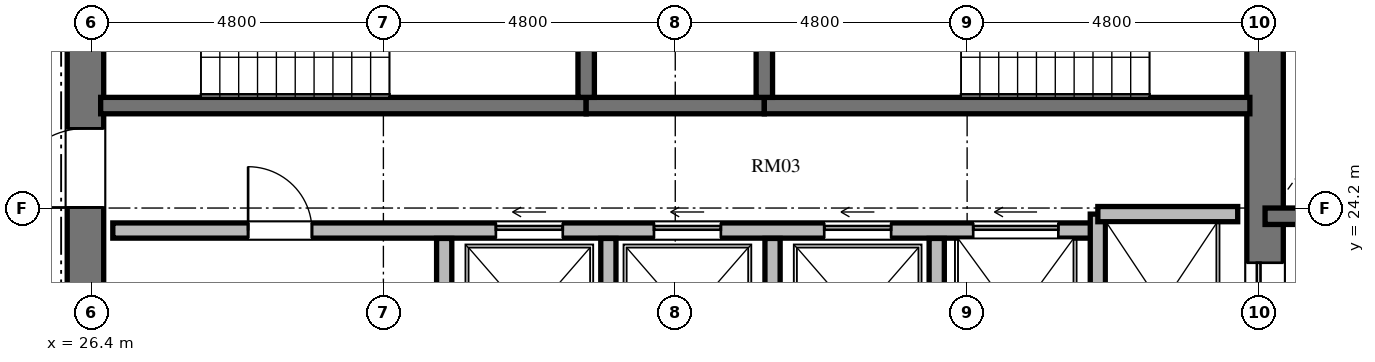
"""IFC4 building model, lengths in metres.
Left out: names, types, materials, properties, quantities, classifications, styles, units other than length and angle.
Written with IfcOpenShell. Run it as: python <this file> out.ifc"""

import sys

from ifc_helpers import new_model, si_unit, direction, frame, frame_2d, origin, place, context, subcontext, project, spatial, rectangle, extrude, element, fill, save


model = new_model("IFC4")
c1 = context("Model", 3, precision=1e-05, world=origin(), true_north=direction((0.0, 1.0)))
c2 = subcontext(c1, "Body", "Model", "MODEL_VIEW")
j1 = project(units=[si_unit("LENGTHUNIT", "METRE"), si_unit("PLANEANGLEUNIT", "RADIAN")], contexts=[c1])
p1 = place(None, origin())
s1 = spatial("IfcSite", under=j1, at=p1, CompositionType="ELEMENT")
p2 = place(p1, origin())
s2 = spatial("IfcBuilding", under=s1, at=p2, CompositionType="ELEMENT")
p3 = place(p2, frame((0.0, 0.0, 145.584)))
s3 = spatial("IfcBuildingStorey", under=s2, at=p3, CompositionType="ELEMENT", Elevation=145.584)
p4 = place(p3, frame((26.3, 20.95, 0.0), z_axis=(0.0, 0.0, 1.0), x_axis=(0.0, 1.0, 0.0)))
e1 = element("IfcWall", 1, at=p4, inside=s3, PredefinedType="SHEAR", context=c2, shape_type="SweptSolid", body=[
    extrude(rectangle(XDim=14.1, YDim=0.6, at=frame_2d((7.05, 0.0))), origin(), (0.0, 0.0, 1.0), 3.648),
])
p5 = place(p4, frame((6.5, 0.0, 0.0)))
e2 = element("IfcOpeningElement", 2, at=p5, cuts=e1, PredefinedType="OPENING", context=c2, shape_type="SweptSolid", body=[
    extrude(rectangle(XDim=1.2, YDim=2.15, at=frame_2d((0.6, 1.075))), frame((0.0, 0.31, 0.0), z_axis=(0.0, -1.0, 0.0), x_axis=(1.0, 0.0, 0.0)), (0.0, 0.0, 1.0), 0.62),
])
p6 = place(p4, frame((9.6, 0.0, 0.0)))
e3 = element("IfcOpeningElement", 3, at=p6, cuts=e1, PredefinedType="OPENING", context=c2, shape_type="SweptSolid", body=[
    extrude(rectangle(XDim=1.3, YDim=2.2, at=frame_2d((0.65, 1.1))), frame((0.0, 0.31, 0.0), z_axis=(0.0, -1.0, 0.0), x_axis=(1.0, 0.0, 0.0)), (0.0, 0.0, 1.0), 0.62),
])
p7 = place(p4, frame((3.26, 0.0, 0.0)))
e4 = element("IfcOpeningElement", 4, at=p7, cuts=e1, PredefinedType="OPENING", context=c2, shape_type="SweptSolid", body=[
    extrude(rectangle(XDim=1.3, YDim=2.2, at=frame_2d((0.65, 1.1))), frame((0.0, 0.31, 0.0), z_axis=(0.0, -1.0, 0.0), x_axis=(1.0, 0.0, 0.0)), (0.0, 0.0, 1.0), 0.62),
])
p8 = place(p3, frame((45.7, 20.95, 0.0), z_axis=(0.0, 0.0, 1.0), x_axis=(0.0, 1.0, 0.0)))
e5 = element("IfcWall", 5, at=p8, inside=s3, PredefinedType="SHEAR", context=c2, shape_type="SweptSolid", body=[
    extrude(rectangle(XDim=14.1, YDim=0.6, at=frame_2d((7.05, 0.0))), origin(), (0.0, 0.0, 1.0), 3.648),
])
p9 = place(p8, frame((11.75, 0.0, 0.0)))
e6 = element("IfcOpeningElement", 6, at=p9, cuts=e5, PredefinedType="OPENING", context=c2, shape_type="SweptSolid", body=[
    extrude(rectangle(XDim=1.4, YDim=2.3, at=frame_2d((0.7, 1.15))), frame((0.0, 0.31, 0.0), z_axis=(0.0, -1.0, 0.0), x_axis=(1.0, 0.0, 0.0)), (0.0, 0.0, 1.0), 0.62),
])
p10 = place(p8, frame((0.95, 0.0, 0.0)))
e7 = element("IfcOpeningElement", 7, at=p10, cuts=e5, PredefinedType="OPENING", context=c2, shape_type="SweptSolid", body=[
    extrude(rectangle(XDim=1.4, YDim=2.3, at=frame_2d((0.7, 1.15))), frame((0.0, 0.31, 0.0), z_axis=(0.0, -1.0, 0.0), x_axis=(1.0, 0.0, 0.0)), (0.0, 0.0, 1.0), 0.62),
])
p11 = place(p3, frame((26.55, 25.885, 0.0), z_axis=(0.0, 0.0, 1.0), x_axis=(1.0, 0.0, 0.0)))
e8 = element("IfcWall", 8, at=p11, inside=s3, PredefinedType="SHEAR", context=c2, shape_type="SweptSolid", body=[
    extrude(rectangle(XDim=7.985, YDim=0.27, at=frame_2d((3.992, 0.0))), origin(), (0.0, 0.0, 1.0), 3.648),
])
p12 = place(p3, frame((34.535, 25.885, 0.0), z_axis=(0.0, 0.0, 1.0), x_axis=(1.0, 0.0, 0.0)))
e9 = element("IfcWall", 9, at=p12, inside=s3, PredefinedType="SHEAR", context=c2, shape_type="SweptSolid", body=[
    extrude(rectangle(XDim=2.93, YDim=0.27, at=frame_2d((1.465, 0.0))), origin(), (0.0, 0.0, 1.0), 3.648),
])
p13 = place(p3, frame((37.465, 25.885, 0.0), z_axis=(0.0, 0.0, 1.0), x_axis=(1.0, 0.0, 0.0)))
e10 = element("IfcWall", 10, at=p13, inside=s3, PredefinedType="SHEAR", context=c2, shape_type="SweptSolid", body=[
    extrude(rectangle(XDim=7.985, YDim=0.27, at=frame_2d((3.992, 0.0))), origin(), (0.0, 0.0, 1.0), 3.648),
])
for number, where, z_axis, x_axis in (
    (11, (34.535, 26.02, 0.0), (0.0, 0.0, 1.0), (0.0, 1.0, 0.0)),
    (12, (37.465, 26.02, 0.0), (0.0, 0.0, 1.0), (0.0, 1.0, 0.0)),
):
    element("IfcWall", number, at=place(p3, frame(where, z_axis=z_axis, x_axis=x_axis)), inside=s3, PredefinedType="SHEAR", context=c2, shape_type="SweptSolid", body=[
        extrude(rectangle(XDim=4.08, YDim=0.27, at=frame_2d((2.04, 0.0))), origin(), (0.0, 0.0, 1.0), 3.648),
    ])
p14 = place(p3, frame((26.75, 23.83, 0.0), z_axis=(0.0, 0.0, 1.0), x_axis=(1.0, 0.0, 0.0)))
e13 = element("IfcWall", 13, at=p14, inside=s3, PredefinedType="SOLIDWALL", context=c2, shape_type="SweptSolid", body=[
    extrude(rectangle(XDim=16.2, YDim=0.25, at=frame_2d((8.1, 0.0))), origin(), (0.0, 0.0, 1.0), 3.428),
])
p15 = place(p14, frame((2.225, 0.0, 0.0)))
e14 = element("IfcOpeningElement", 14, at=p15, cuts=e13, PredefinedType="OPENING", context=c2, shape_type="SweptSolid", body=[
    extrude(rectangle(XDim=1.05, YDim=2.15, at=frame_2d((0.525, 1.075))), frame((0.0, 0.135, 0.0), z_axis=(0.0, -1.0, 0.0), x_axis=(1.0, 0.0, 0.0)), (0.0, 0.0, 1.0), 0.27),
])
p16 = place(p14, frame((6.3, 0.0, 0.0)))
e15 = element("IfcOpeningElement", 15, at=p16, cuts=e13, PredefinedType="OPENING", context=c2, shape_type="SweptSolid", body=[
    extrude(rectangle(XDim=1.1, YDim=2.2, at=frame_2d((0.55, 1.1))), frame((0.0, 0.135, 0.0), z_axis=(0.0, -1.0, 0.0), x_axis=(1.0, 0.0, 0.0)), (0.0, 0.0, 1.0), 0.27),
])
p17 = place(p14, frame((8.9, 0.0, 0.0)))
e16 = element("IfcOpeningElement", 16, at=p17, cuts=e13, PredefinedType="OPENING", context=c2, shape_type="SweptSolid", body=[
    extrude(rectangle(XDim=1.1, YDim=2.2, at=frame_2d((0.55, 1.1))), frame((0.0, 0.135, 0.0), z_axis=(0.0, -1.0, 0.0), x_axis=(1.0, 0.0, 0.0)), (0.0, 0.0, 1.0), 0.27),
])
p18 = place(p14, frame((11.7, 0.0, 0.0)))
e17 = element("IfcOpeningElement", 17, at=p18, cuts=e13, PredefinedType="OPENING", context=c2, shape_type="SweptSolid", body=[
    extrude(rectangle(XDim=1.1, YDim=2.2, at=frame_2d((0.55, 1.1))), frame((0.0, 0.135, 0.0), z_axis=(0.0, -1.0, 0.0), x_axis=(1.0, 0.0, 0.0)), (0.0, 0.0, 1.0), 0.27),
])
p19 = place(p14, frame((14.15, 0.0, 0.0)))
e18 = element("IfcOpeningElement", 18, at=p19, cuts=e13, PredefinedType="OPENING", context=c2, shape_type="SweptSolid", body=[
    extrude(rectangle(XDim=1.4, YDim=2.3, at=frame_2d((0.7, 1.15))), frame((0.0, 0.135, 0.0), z_axis=(0.0, -1.0, 0.0), x_axis=(1.0, 0.0, 0.0)), (0.0, 0.0, 1.0), 0.27),
])
p20 = place(p3, frame((42.95, 20.9, 0.0), z_axis=(0.0, 0.0, 1.0), x_axis=(0.0, 1.0, 0.0)))
e19 = element("IfcWall", 19, at=p20, inside=s3, PredefinedType="SOLIDWALL", context=c2, shape_type="SweptSolid", body=[
    extrude(rectangle(XDim=3.2, YDim=0.25, at=frame_2d((1.6, 0.0))), origin(), (0.0, 0.0, 1.0), 3.428),
])
p21 = place(p3, frame((42.95, 24.1, 0.0), z_axis=(0.0, 0.0, 1.0), x_axis=(1.0, 0.0, 0.0)))
e20 = element("IfcWall", 20, at=p21, inside=s3, PredefinedType="SOLIDWALL", context=c2, shape_type="SweptSolid", body=[
    extrude(rectangle(XDim=2.3, YDim=0.25, at=frame_2d((1.15, 0.0))), origin(), (0.0, 0.0, 1.0), 3.428),
])
for number, where, z_axis, x_axis in (
    (21, (32.2, 20.9, 0.0), (0.0, 0.0, 1.0), (0.0, 1.0, 0.0)),
    (22, (34.9, 20.9, 0.0), (0.0, 0.0, 1.0), (0.0, 1.0, 0.0)),
    (23, (37.6, 20.9, 0.0), (0.0, 0.0, 1.0), (0.0, 1.0, 0.0)),
    (24, (40.3, 20.9, 0.0), (0.0, 0.0, 1.0), (0.0, 1.0, 0.0)),
):
    element("IfcWall", number, at=place(p3, frame(where, z_axis=z_axis, x_axis=x_axis)), inside=s3, PredefinedType="SOLIDWALL", context=c2, shape_type="SweptSolid", body=[
        extrude(rectangle(XDim=2.8, YDim=0.25, at=frame_2d((1.4, 0.0))), origin(), (0.0, 0.0, 1.0), 3.428),
    ])
p22 = place(p3, frame((45.7, 24.065, 0.0), z_axis=(0.0, 0.0, 1.0), x_axis=(1.0, 0.0, 0.0)))
e25 = element("IfcWall", 25, at=p22, inside=s3, PredefinedType="SHEAR", context=c2, shape_type="SweptSolid", body=[
    extrude(rectangle(XDim=4.715, YDim=0.27, at=frame_2d((2.357, 0.0))), origin(), (0.0, 0.0, 1.0), 3.648),
])
p23 = place(p7, origin())
e26 = element("IfcDoor", 26, at=p23, inside=s3, OperationType="SINGLE_SWING_LEFT", PredefinedType="DOOR", context=c2, shape_type="SweptSolid", body=[
    extrude(rectangle(XDim=1.3, YDim=2.2, at=frame_2d((0.65, 1.1))), frame((0.0, 0.025, 0.0), z_axis=(0.0, -1.0, 0.0), x_axis=(1.0, 0.0, 0.0)), (0.0, 0.0, 1.0), 0.05),
])
fill(e4, e26)
p24 = place(p15, origin())
e27 = element("IfcDoor", 27, at=p24, inside=s3, OperationType="SINGLE_SWING_LEFT", PredefinedType="DOOR", context=c2, shape_type="SweptSolid", body=[
    extrude(rectangle(XDim=1.05, YDim=2.15, at=frame_2d((0.525, 1.075))), frame((0.0, 0.025, 0.0), z_axis=(0.0, -1.0, 0.0), x_axis=(1.0, 0.0, 0.0)), (0.0, 0.0, 1.0), 0.05),
])
fill(e14, e27)
p25 = place(p16, origin())
e28 = element("IfcDoor", 28, at=p25, inside=s3, OperationType="SLIDING_TO_LEFT", PredefinedType="DOOR", context=c2, shape_type="SweptSolid", body=[
    extrude(rectangle(XDim=1.1, YDim=2.2, at=frame_2d((0.55, 1.1))), frame((0.0, 0.025, 0.0), z_axis=(0.0, -1.0, 0.0), x_axis=(1.0, 0.0, 0.0)), (0.0, 0.0, 1.0), 0.05),
])
fill(e15, e28)
p26 = place(p17, origin())
e29 = element("IfcDoor", 29, at=p26, inside=s3, OperationType="SLIDING_TO_LEFT", PredefinedType="DOOR", context=c2, shape_type="SweptSolid", body=[
    extrude(rectangle(XDim=1.1, YDim=2.2, at=frame_2d((0.55, 1.1))), frame((0.0, 0.025, 0.0), z_axis=(0.0, -1.0, 0.0), x_axis=(1.0, 0.0, 0.0)), (0.0, 0.0, 1.0), 0.05),
])
fill(e16, e29)
p27 = place(p18, origin())
e30 = element("IfcDoor", 30, at=p27, inside=s3, OperationType="SLIDING_TO_LEFT", PredefinedType="DOOR", context=c2, shape_type="SweptSolid", body=[
    extrude(rectangle(XDim=1.1, YDim=2.2, at=frame_2d((0.55, 1.1))), frame((0.0, 0.025, 0.0), z_axis=(0.0, -1.0, 0.0), x_axis=(1.0, 0.0, 0.0)), (0.0, 0.0, 1.0), 0.05),
])
fill(e17, e30)
p28 = place(p10, origin())
e31 = element("IfcDoor", 31, at=p28, inside=s3, OperationType="SLIDING_TO_LEFT", PredefinedType="DOOR", context=c2, shape_type="SweptSolid", body=[
    extrude(rectangle(XDim=1.4, YDim=2.3, at=frame_2d((0.7, 1.15))), frame((0.0, 0.025, 0.0), z_axis=(0.0, -1.0, 0.0), x_axis=(1.0, 0.0, 0.0)), (0.0, 0.0, 1.0), 0.05),
])
fill(e7, e31)
p29 = place(p19, origin())
e32 = element("IfcDoor", 32, at=p29, inside=s3, OperationType="SLIDING_TO_LEFT", PredefinedType="DOOR", context=c2, shape_type="SweptSolid", body=[
    extrude(rectangle(XDim=1.4, YDim=2.3, at=frame_2d((0.7, 1.15))), frame((0.0, 0.025, 0.0), z_axis=(0.0, -1.0, 0.0), x_axis=(1.0, 0.0, 0.0)), (0.0, 0.0, 1.0), 0.05),
])
fill(e18, e32)
save(model, sys.argv[1])
